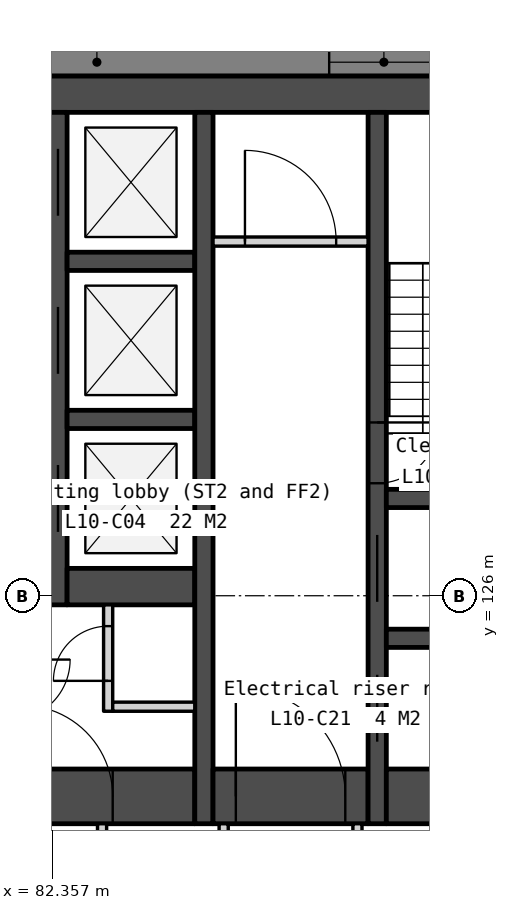
"""IFC4 building model, lengths in metres.
Left out: names, types, materials, properties, quantities, classifications, styles, units other than length and angle.
Written with IfcOpenShell. Run it as: python <this file> out.ifc"""

import sys

from ifc_helpers import new_model, si_unit, direction, frame, frame_2d, origin, place, context, subcontext, project, spatial, polyline, rectangle, outline, extrude, element, fill, save


model = new_model("IFC4")
c1 = context("Model", 3, precision=1e-05, world=origin(), true_north=direction((0.0, 1.0)))
c2 = subcontext(c1, "Body", "Model", "MODEL_VIEW")
j1 = project(units=[si_unit("LENGTHUNIT", "METRE"), si_unit("PLANEANGLEUNIT", "RADIAN")], contexts=[c1])
p1 = place(None, origin())
s1 = spatial("IfcSite", under=j1, at=p1, CompositionType="ELEMENT")
p2 = place(p1, origin())
s2 = spatial("IfcBuilding", under=s1, at=p2, CompositionType="ELEMENT")
p3 = place(p2, frame((0.0, 0.0, 49.0)))
s3 = spatial("IfcBuildingStorey", under=s2, at=p3, CompositionType="ELEMENT", Elevation=49.0)
p4 = place(p3, frame((66.0, 134.25, 0.0), z_axis=(0.0, 0.0, 1.0), x_axis=(1.0, 0.0, 0.0)))
e1 = element("IfcWall", 1, at=p4, inside=s3, PredefinedType="SOLIDWALL", context=c2, shape_type="SweptSolid", body=[
    extrude(rectangle(XDim=28.0, YDim=0.6, at=frame_2d((14.0, 0.0))), origin(), (0.0, 0.0, 1.0), 3.35),
])
p5 = place(p3, frame((81.8, 122.7, 0.0), z_axis=(0.0, 0.0, 1.0), x_axis=(1.0, 0.0, 0.0)))
e2 = element("IfcWall", 2, at=p5, inside=s3, PredefinedType="SOLIDWALL", context=c2, shape_type="SweptSolid", body=[
    extrude(rectangle(XDim=2.9, YDim=0.9, at=frame_2d((1.45, 0.0))), origin(), (0.0, 0.0, 1.0), 3.35),
])
p6 = place(p5, frame((0.05, 0.0, 0.0)))
e3 = element("IfcOpeningElement", 3, at=p6, cuts=e2, PredefinedType="OPENING", context=c2, shape_type="SweptSolid", body=[
    extrude(rectangle(XDim=1.5, YDim=2.1, at=frame_2d((0.75, 1.05))), frame((0.0, 0.46, 0.0), z_axis=(0.0, -1.0, 0.0), x_axis=(1.0, 0.0, 0.0)), (0.0, 0.0, 1.0), 0.92),
])
p7 = place(p3, frame((82.45, 133.95, 0.0), z_axis=(0.0, 0.0, 1.0), x_axis=(0.0, -1.0, 0.0)))
e4 = element("IfcWall", 4, at=p7, inside=s3, PredefinedType="SOLIDWALL", context=c2, shape_type="SweptSolid", body=[
    extrude(rectangle(XDim=8.1, YDim=0.3, at=frame_2d((4.05, 0.0))), origin(), (0.0, 0.0, 1.0), 3.35),
])
p8 = place(p7, frame((0.6, 0.0, 0.0)))
e5 = element("IfcOpeningElement", 5, at=p8, cuts=e4, PredefinedType="OPENING", context=c2, shape_type="SweptSolid", body=[
    extrude(rectangle(XDim=1.1, YDim=2.1, at=frame_2d((0.55, 1.05))), frame((0.0, 0.16, 0.0), z_axis=(0.0, -1.0, 0.0), x_axis=(1.0, 0.0, 0.0)), (0.0, 0.0, 1.0), 0.32),
])
p9 = place(p7, frame((3.2, 0.0, 0.0)))
e6 = element("IfcOpeningElement", 6, at=p9, cuts=e4, PredefinedType="OPENING", context=c2, shape_type="SweptSolid", body=[
    extrude(rectangle(XDim=1.1, YDim=2.1, at=frame_2d((0.55, 1.05))), frame((0.0, 0.16, 0.0), z_axis=(0.0, -1.0, 0.0), x_axis=(1.0, 0.0, 0.0)), (0.0, 0.0, 1.0), 0.32),
])
p10 = place(p7, frame((5.8, 0.0, 0.0)))
e7 = element("IfcOpeningElement", 7, at=p10, cuts=e4, PredefinedType="OPENING", context=c2, shape_type="SweptSolid", body=[
    extrude(rectangle(XDim=1.1, YDim=2.1, at=frame_2d((0.55, 1.05))), frame((0.0, 0.16, 0.0), z_axis=(0.0, -1.0, 0.0), x_axis=(1.0, 0.0, 0.0)), (0.0, 0.0, 1.0), 0.32),
])
for number, where, z_axis, x_axis in (
    (8, (82.6, 131.5, 0.0), (0.0, 0.0, 1.0), (1.0, 0.0, 0.0)),
    (9, (82.6, 128.9, 0.0), (0.0, 0.0, 1.0), (1.0, 0.0, 0.0)),
):
    element("IfcWall", number, at=place(p3, frame(where, z_axis=z_axis, x_axis=x_axis)), inside=s3, PredefinedType="SOLIDWALL", context=c2, shape_type="SweptSolid", body=[
        extrude(rectangle(XDim=2.1, YDim=0.3, at=frame_2d((1.05, 0.0))), origin(), (0.0, 0.0, 1.0), 3.35),
    ])
p11 = place(p3, frame((82.6, 126.15, 0.0), z_axis=(0.0, 0.0, 1.0), x_axis=(1.0, 0.0, 0.0)))
e10 = element("IfcWall", 10, at=p11, inside=s3, PredefinedType="SOLIDWALL", context=c2, shape_type="SweptSolid", body=[
    extrude(rectangle(XDim=2.1, YDim=0.6, at=frame_2d((1.05, 0.0))), origin(), (0.0, 0.0, 1.0), 3.35),
])
p12 = place(p3, frame((83.175, 122.25, 0.0), z_axis=(0.0, 0.0, 1.0), x_axis=(0.0, -1.0, 0.0)))
e11 = element("IfcWall", 11, at=p12, inside=s3, PredefinedType="PARTITIONING", context=c2, shape_type="SweptSolid", body=[
    extrude(rectangle(XDim=2.1, YDim=0.15, at=frame_2d((1.05, 0.0))), origin(), (0.0, 0.0, 1.0), 3.35),
])
p13 = place(p3, frame((83.275, 125.85, 0.0), z_axis=(0.0, 0.0, 1.0), x_axis=(0.0, -1.0, 0.0)))
e12 = element("IfcWall", 12, at=p13, inside=s3, PredefinedType="PARTITIONING", context=c2, shape_type="SweptSolid", body=[
    extrude(rectangle(XDim=1.75, YDim=0.15, at=frame_2d((0.875, 0.0))), origin(), (0.0, 0.0, 1.0), 3.35),
])
p14 = place(p13, frame((0.35, 0.0, 0.0)))
e13 = element("IfcOpeningElement", 13, at=p14, cuts=e12, PredefinedType="OPENING", context=c2, shape_type="SweptSolid", body=[
    extrude(rectangle(XDim=0.9, YDim=2.1, at=frame_2d((0.45, 1.05))), frame((0.0, 0.085, 0.0), z_axis=(0.0, -1.0, 0.0), x_axis=(1.0, 0.0, 0.0)), (0.0, 0.0, 1.0), 0.17),
])
p15 = place(p3, frame((83.35, 124.175, 0.0), z_axis=(0.0, 0.0, 1.0), x_axis=(1.0, 0.0, 0.0)))
e14 = element("IfcWall", 14, at=p15, inside=s3, PredefinedType="PARTITIONING", context=c2, shape_type="SweptSolid", body=[
    extrude(rectangle(XDim=1.35, YDim=0.15, at=frame_2d((0.675, 0.0))), origin(), (0.0, 0.0, 1.0), 3.35),
])
p16 = place(p3, frame((84.85, 133.95, 0.0), z_axis=(0.0, 0.0, 1.0), x_axis=(0.0, -1.0, 0.0)))
e15 = element("IfcWall", 15, at=p16, inside=s3, PredefinedType="SOLIDWALL", context=c2, shape_type="SweptSolid", body=[
    extrude(rectangle(XDim=11.7, YDim=0.3, at=frame_2d((5.85, 0.0))), origin(), (0.0, 0.0, 1.0), 3.35),
])
p17 = place(p3, frame((85.0, 131.825, 0.0), z_axis=(0.0, 0.0, 1.0), x_axis=(1.0, 0.0, 0.0)))
e16 = element("IfcWall", 16, at=p17, inside=s3, PredefinedType="PARTITIONING", context=c2, shape_type="SweptSolid", body=[
    extrude(rectangle(XDim=2.55, YDim=0.15, at=frame_2d((1.275, 0.0))), origin(), (0.0, 0.0, 1.0), 3.35),
])
p18 = place(p17, frame((0.525, 0.0, 0.0)))
e17 = element("IfcOpeningElement", 17, at=p18, cuts=e16, PredefinedType="OPENING", context=c2, shape_type="SweptSolid", body=[
    extrude(rectangle(XDim=1.5, YDim=2.1, at=frame_2d((0.75, 1.05))), frame((0.0, 0.085, 0.0), z_axis=(0.0, -1.0, 0.0), x_axis=(1.0, 0.0, 0.0)), (0.0, 0.0, 1.0), 0.17),
])
p19 = place(p3, frame((85.0, 122.7, 0.0), z_axis=(0.0, 0.0, 1.0), x_axis=(1.0, 0.0, 0.0)))
e18 = element("IfcWall", 18, at=p19, inside=s3, PredefinedType="SOLIDWALL", context=c2, shape_type="SweptSolid", body=[
    extrude(rectangle(XDim=2.55, YDim=0.9, at=frame_2d((1.275, 0.0))), origin(), (0.0, 0.0, 1.0), 3.35),
])
p20 = place(p19, frame((0.375, 0.0, 0.0)))
e19 = element("IfcOpeningElement", 19, at=p20, cuts=e18, PredefinedType="OPENING", context=c2, shape_type="SweptSolid", body=[
    extrude(rectangle(XDim=1.8, YDim=2.1, at=frame_2d((0.9, 1.05))), frame((0.0, 0.46, 0.0), z_axis=(0.0, -1.0, 0.0), x_axis=(1.0, 0.0, 0.0)), (0.0, 0.0, 1.0), 0.92),
])
p21 = place(p3, frame((85.175, 122.25, 0.0), z_axis=(0.0, 0.0, 1.0), x_axis=(0.0, -1.0, 0.0)))
e20 = element("IfcWall", 20, at=p21, inside=s3, PredefinedType="PARTITIONING", context=c2, shape_type="SweptSolid", body=[
    extrude(rectangle(XDim=2.1, YDim=0.15, at=frame_2d((1.05, 0.0))), origin(), (0.0, 0.0, 1.0), 3.35),
])
p22 = place(p21, frame((0.55, 0.0, 0.0)))
e21 = element("IfcOpeningElement", 21, at=p22, cuts=e20, PredefinedType="OPENING", context=c2, shape_type="SweptSolid", body=[
    extrude(rectangle(XDim=1.0, YDim=2.1, at=frame_2d((0.5, 1.05))), frame((0.0, 0.085, 0.0), z_axis=(0.0, -1.0, 0.0), x_axis=(1.0, 0.0, 0.0)), (0.0, 0.0, 1.0), 0.17),
])
p23 = place(p3, frame((87.375, 122.25, 0.0), z_axis=(0.0, 0.0, 1.0), x_axis=(0.0, -1.0, 0.0)))
e22 = element("IfcWall", 22, at=p23, inside=s3, PredefinedType="PARTITIONING", context=c2, shape_type="SweptSolid", body=[
    extrude(rectangle(XDim=2.1, YDim=0.15, at=frame_2d((1.05, 0.0))), origin(), (0.0, 0.0, 1.0), 3.35),
])
p24 = place(p3, frame((87.7, 133.95, 0.0), z_axis=(0.0, 0.0, 1.0), x_axis=(0.0, -1.0, 0.0)))
e23 = element("IfcWall", 23, at=p24, inside=s3, PredefinedType="SOLIDWALL", context=c2, shape_type="SweptSolid", body=[
    extrude(rectangle(XDim=11.7, YDim=0.3, at=frame_2d((5.85, 0.0))), origin(), (0.0, 0.0, 1.0), 3.35),
])
p25 = place(p24, frame((6.95, 0.0, 0.0)))
e24 = element("IfcOpeningElement", 24, at=p25, cuts=e23, PredefinedType="OPENING", context=c2, shape_type="SweptSolid", body=[
    extrude(rectangle(XDim=1.1, YDim=2.1, at=frame_2d((0.55, 1.05))), frame((0.0, 0.16, 0.0), z_axis=(0.0, -1.0, 0.0), x_axis=(1.0, 0.0, 0.0)), (0.0, 0.0, 1.0), 0.32),
])
p26 = place(p24, frame((5.1, 0.0, 0.0)))
e25 = element("IfcOpeningElement", 25, at=p26, cuts=e23, PredefinedType="OPENING", context=c2, shape_type="SweptSolid", body=[
    extrude(rectangle(XDim=1.0, YDim=2.1, at=frame_2d((0.5, 1.05))), frame((0.0, 0.16, 0.0), z_axis=(0.0, -1.0, 0.0), x_axis=(1.0, 0.0, 0.0)), (0.0, 0.0, 1.0), 0.32),
])
p27 = place(p24, frame((9.25, 0.0, 0.0)))
e26 = element("IfcOpeningElement", 26, at=p27, cuts=e23, PredefinedType="OPENING", context=c2, shape_type="SweptSolid", body=[
    extrude(rectangle(XDim=1.1, YDim=2.1, at=frame_2d((0.55, 1.05))), frame((0.0, 0.16, 0.0), z_axis=(0.0, -1.0, 0.0), x_axis=(1.0, 0.0, 0.0)), (0.0, 0.0, 1.0), 0.32),
])
for number, where, z_axis, x_axis in (
    (27, (87.85, 127.6, 0.0), (0.0, 0.0, 1.0), (1.0, 0.0, 0.0)),
    (28, (87.85, 125.3, 0.0), (0.0, 0.0, 1.0), (1.0, 0.0, 0.0)),
):
    element("IfcWall", number, at=place(p3, frame(where, z_axis=z_axis, x_axis=x_axis)), inside=s3, PredefinedType="SOLIDWALL", context=c2, shape_type="SweptSolid", body=[
        extrude(rectangle(XDim=2.55, YDim=0.3, at=frame_2d((1.275, 0.0))), origin(), (0.0, 0.0, 1.0), 3.35),
    ])
p28 = place(p3, frame((87.85, 122.7, 0.0), z_axis=(0.0, 0.0, 1.0), x_axis=(1.0, 0.0, 0.0)))
e29 = element("IfcWall", 29, at=p28, inside=s3, PredefinedType="SOLIDWALL", context=c2, shape_type="SweptSolid", body=[
    extrude(rectangle(XDim=2.55, YDim=0.9, at=frame_2d((1.275, 0.0))), origin(), (0.0, 0.0, 1.0), 3.35),
])
p29 = place(p3, frame((102.4, 134.775, -0.15), z_axis=(0.0, 0.0, 1.0), x_axis=(-1.0, 0.0, 0.0)))
e30 = element("IfcWall", 30, at=p29, inside=s3, PredefinedType="SOLIDWALL", context=c2, shape_type="SweptSolid", body=[
    extrude(outline(polyline([(0.0, 0.0), (0.0, 3.5), (38.62, 3.5), (38.62, 0.0), (0.0, 0.0)])), frame((0.0, 0.225, 0.0), z_axis=(0.0, -1.0, 0.0), x_axis=(1.0, 0.0, 0.0)), (0.0, 0.0, 1.0), 0.45),
])
p30 = place(p29, frame((2.43, 0.0, 1.05)))
e31 = element("IfcOpeningElement", 31, at=p30, cuts=e30, PredefinedType="OPENING", context=c2, shape_type="SweptSolid", body=[
    extrude(rectangle(XDim=1.8, YDim=1.5, at=frame_2d((0.9, 0.75))), frame((0.0, 0.235, 0.0), z_axis=(0.0, -1.0, 0.0), x_axis=(1.0, 0.0, 0.0)), (0.0, 0.0, 1.0), 0.47),
])
p31 = place(p29, frame((4.73, 0.0, 1.05)))
e32 = element("IfcOpeningElement", 32, at=p31, cuts=e30, PredefinedType="OPENING", context=c2, shape_type="SweptSolid", body=[
    extrude(rectangle(XDim=1.8, YDim=1.5, at=frame_2d((0.9, 0.75))), frame((0.0, 0.235, 0.0), z_axis=(0.0, -1.0, 0.0), x_axis=(1.0, 0.0, 0.0)), (0.0, 0.0, 1.0), 0.47),
])
p32 = place(p29, frame((11.39, 0.0, 1.05)))
e33 = element("IfcOpeningElement", 33, at=p32, cuts=e30, PredefinedType="OPENING", context=c2, shape_type="SweptSolid", body=[
    extrude(rectangle(XDim=1.8, YDim=1.5, at=frame_2d((0.9, 0.75))), frame((0.0, 0.235, 0.0), z_axis=(0.0, -1.0, 0.0), x_axis=(1.0, 0.0, 0.0)), (0.0, 0.0, 1.0), 0.47),
])
p33 = place(p29, frame((13.69, 0.0, 1.05)))
e34 = element("IfcOpeningElement", 34, at=p33, cuts=e30, PredefinedType="OPENING", context=c2, shape_type="SweptSolid", body=[
    extrude(rectangle(XDim=1.8, YDim=1.5, at=frame_2d((0.9, 0.75))), frame((0.0, 0.235, 0.0), z_axis=(0.0, -1.0, 0.0), x_axis=(1.0, 0.0, 0.0)), (0.0, 0.0, 1.0), 0.47),
])
p34 = place(p29, frame((20.35, 0.0, 1.05)))
e35 = element("IfcOpeningElement", 35, at=p34, cuts=e30, PredefinedType="OPENING", context=c2, shape_type="SweptSolid", body=[
    extrude(rectangle(XDim=1.8, YDim=1.5, at=frame_2d((0.9, 0.75))), frame((0.0, 0.235, 0.0), z_axis=(0.0, -1.0, 0.0), x_axis=(1.0, 0.0, 0.0)), (0.0, 0.0, 1.0), 0.47),
])
p35 = place(p29, frame((22.65, 0.0, 1.05)))
e36 = element("IfcOpeningElement", 36, at=p35, cuts=e30, PredefinedType="OPENING", context=c2, shape_type="SweptSolid", body=[
    extrude(rectangle(XDim=1.8, YDim=1.5, at=frame_2d((0.9, 0.75))), frame((0.0, 0.235, 0.0), z_axis=(0.0, -1.0, 0.0), x_axis=(1.0, 0.0, 0.0)), (0.0, 0.0, 1.0), 0.47),
])
p36 = place(p29, frame((29.31, 0.0, 1.05)))
e37 = element("IfcOpeningElement", 37, at=p36, cuts=e30, PredefinedType="OPENING", context=c2, shape_type="SweptSolid", body=[
    extrude(rectangle(XDim=1.8, YDim=1.5, at=frame_2d((0.9, 0.75))), frame((0.0, 0.235, 0.0), z_axis=(0.0, -1.0, 0.0), x_axis=(1.0, 0.0, 0.0)), (0.0, 0.0, 1.0), 0.47),
])
p37 = place(p29, frame((31.61, 0.0, 1.05)))
e38 = element("IfcOpeningElement", 38, at=p37, cuts=e30, PredefinedType="OPENING", context=c2, shape_type="SweptSolid", body=[
    extrude(rectangle(XDim=1.8, YDim=1.5, at=frame_2d((0.9, 0.75))), frame((0.0, 0.235, 0.0), z_axis=(0.0, -1.0, 0.0), x_axis=(1.0, 0.0, 0.0)), (0.0, 0.0, 1.0), 0.47),
])
p38 = place(p3, frame((83.105, 90.599, -0.15), z_axis=(0.0, 0.0, 1.0), x_axis=(0.499999201451, 0.866025864826, 0.0)))
e39 = element("IfcWall", 39, at=p38, inside=s3, PredefinedType="SOLIDWALL", context=c2, shape_type="SweptSolid", body=[
    extrude(outline(polyline([(44.8, 0.0), (44.8, 3.5), (0.0, 3.5), (0.0, 0.0), (44.8, 0.0)])), frame((0.0, 0.225, 0.0), z_axis=(0.0, -1.0, 0.0), x_axis=(1.0, 0.0, 0.0)), (0.0, 0.0, 1.0), 0.45),
])
p39 = place(p38, frame((2.43, 0.0, 1.05)))
e40 = element("IfcOpeningElement", 40, at=p39, cuts=e39, PredefinedType="OPENING", context=c2, shape_type="SweptSolid", body=[
    extrude(rectangle(XDim=1.8, YDim=1.5, at=frame_2d((0.9, 0.75))), frame((0.0, 0.235, 0.0), z_axis=(0.0, -1.0, 0.0), x_axis=(1.0, 0.0, 0.0)), (0.0, 0.0, 1.0), 0.47),
])
p40 = place(p38, frame((4.73, 0.0, 1.05)))
e41 = element("IfcOpeningElement", 41, at=p40, cuts=e39, PredefinedType="OPENING", context=c2, shape_type="SweptSolid", body=[
    extrude(rectangle(XDim=1.8, YDim=1.5, at=frame_2d((0.9, 0.75))), frame((0.0, 0.235, 0.0), z_axis=(0.0, -1.0, 0.0), x_axis=(1.0, 0.0, 0.0)), (0.0, 0.0, 1.0), 0.47),
])
p41 = place(p38, frame((11.39, 0.0, 1.05)))
e42 = element("IfcOpeningElement", 42, at=p41, cuts=e39, PredefinedType="OPENING", context=c2, shape_type="SweptSolid", body=[
    extrude(rectangle(XDim=1.8, YDim=1.5, at=frame_2d((0.9, 0.75))), frame((0.0, 0.235, 0.0), z_axis=(0.0, -1.0, 0.0), x_axis=(1.0, 0.0, 0.0)), (0.0, 0.0, 1.0), 0.47),
])
p42 = place(p38, frame((13.69, 0.0, 1.05)))
e43 = element("IfcOpeningElement", 43, at=p42, cuts=e39, PredefinedType="OPENING", context=c2, shape_type="SweptSolid", body=[
    extrude(rectangle(XDim=1.8, YDim=1.5, at=frame_2d((0.9, 0.75))), frame((0.0, 0.235, 0.0), z_axis=(0.0, -1.0, 0.0), x_axis=(1.0, 0.0, 0.0)), (0.0, 0.0, 1.0), 0.47),
])
p43 = place(p38, frame((20.35, 0.0, 1.05)))
e44 = element("IfcOpeningElement", 44, at=p43, cuts=e39, PredefinedType="OPENING", context=c2, shape_type="SweptSolid", body=[
    extrude(rectangle(XDim=1.8, YDim=1.5, at=frame_2d((0.9, 0.75))), frame((0.0, 0.235, 0.0), z_axis=(0.0, -1.0, 0.0), x_axis=(1.0, 0.0, 0.0)), (0.0, 0.0, 1.0), 0.47),
])
p44 = place(p38, frame((22.65, 0.0, 1.05)))
e45 = element("IfcOpeningElement", 45, at=p44, cuts=e39, PredefinedType="OPENING", context=c2, shape_type="SweptSolid", body=[
    extrude(rectangle(XDim=1.8, YDim=1.5, at=frame_2d((0.9, 0.75))), frame((0.0, 0.235, 0.0), z_axis=(0.0, -1.0, 0.0), x_axis=(1.0, 0.0, 0.0)), (0.0, 0.0, 1.0), 0.47),
])
p45 = place(p38, frame((29.31, 0.0, 1.05)))
e46 = element("IfcOpeningElement", 46, at=p45, cuts=e39, PredefinedType="OPENING", context=c2, shape_type="SweptSolid", body=[
    extrude(rectangle(XDim=1.8, YDim=1.5, at=frame_2d((0.9, 0.75))), frame((0.0, 0.235, 0.0), z_axis=(0.0, -1.0, 0.0), x_axis=(1.0, 0.0, 0.0)), (0.0, 0.0, 1.0), 0.47),
])
p46 = place(p38, frame((31.61, 0.0, 1.05)))
e47 = element("IfcOpeningElement", 47, at=p46, cuts=e39, PredefinedType="OPENING", context=c2, shape_type="SweptSolid", body=[
    extrude(rectangle(XDim=1.8, YDim=1.5, at=frame_2d((0.9, 0.75))), frame((0.0, 0.235, 0.0), z_axis=(0.0, -1.0, 0.0), x_axis=(1.0, 0.0, 0.0)), (0.0, 0.0, 1.0), 0.47),
])
p47 = place(p38, frame((38.27, 0.0, 1.05)))
e48 = element("IfcOpeningElement", 48, at=p47, cuts=e39, PredefinedType="OPENING", context=c2, shape_type="SweptSolid", body=[
    extrude(rectangle(XDim=1.8, YDim=1.5, at=frame_2d((0.9, 0.75))), frame((0.0, 0.235, 0.0), z_axis=(0.0, -1.0, 0.0), x_axis=(1.0, 0.0, 0.0)), (0.0, 0.0, 1.0), 0.47),
])
p48 = place(p38, frame((40.57, 0.0, 1.05)))
e49 = element("IfcOpeningElement", 49, at=p48, cuts=e39, PredefinedType="OPENING", context=c2, shape_type="SweptSolid", body=[
    extrude(rectangle(XDim=1.8, YDim=1.5, at=frame_2d((0.9, 0.75))), frame((0.0, 0.235, 0.0), z_axis=(0.0, -1.0, 0.0), x_axis=(1.0, 0.0, 0.0)), (0.0, 0.0, 1.0), 0.47),
])
p49 = place(p8, origin())
e50 = element("IfcDoor", 50, at=p49, inside=s3, OperationType="SLIDING_TO_LEFT", PredefinedType="DOOR", context=c2, shape_type="SweptSolid", body=[
    extrude(rectangle(XDim=1.1, YDim=2.1, at=frame_2d((0.55, 1.05))), frame((0.0, 0.025, 0.0), z_axis=(0.0, -1.0, 0.0), x_axis=(1.0, 0.0, 0.0)), (0.0, 0.0, 1.0), 0.05),
])
fill(e5, e50)
p50 = place(p9, origin())
e51 = element("IfcDoor", 51, at=p50, inside=s3, OperationType="SLIDING_TO_LEFT", PredefinedType="DOOR", context=c2, shape_type="SweptSolid", body=[
    extrude(rectangle(XDim=1.1, YDim=2.1, at=frame_2d((0.55, 1.05))), frame((0.0, 0.025, 0.0), z_axis=(0.0, -1.0, 0.0), x_axis=(1.0, 0.0, 0.0)), (0.0, 0.0, 1.0), 0.05),
])
fill(e6, e51)
p51 = place(p10, origin())
e52 = element("IfcDoor", 52, at=p51, inside=s3, OperationType="SLIDING_TO_LEFT", PredefinedType="DOOR", context=c2, shape_type="SweptSolid", body=[
    extrude(rectangle(XDim=1.1, YDim=2.1, at=frame_2d((0.55, 1.05))), frame((0.0, 0.025, 0.0), z_axis=(0.0, -1.0, 0.0), x_axis=(1.0, 0.0, 0.0)), (0.0, 0.0, 1.0), 0.05),
])
fill(e7, e52)
p52 = place(p25, origin())
e53 = element("IfcDoor", 53, at=p52, inside=s3, OperationType="SLIDING_TO_LEFT", PredefinedType="DOOR", context=c2, shape_type="SweptSolid", body=[
    extrude(rectangle(XDim=1.1, YDim=2.1, at=frame_2d((0.55, 1.05))), frame((0.0, 0.025, 0.0), z_axis=(0.0, -1.0, 0.0), x_axis=(1.0, 0.0, 0.0)), (0.0, 0.0, 1.0), 0.05),
])
fill(e24, e53)
p53 = place(p20, origin())
e54 = element("IfcDoor", 54, at=p53, inside=s3, OperationType="DOUBLE_DOOR_DOUBLE_SWING", PredefinedType="DOOR", context=c2, shape_type="SweptSolid", body=[
    extrude(rectangle(XDim=1.8, YDim=2.1, at=frame_2d((0.9, 1.05))), frame((0.0, 0.025, 0.0), z_axis=(0.0, -1.0, 0.0), x_axis=(1.0, 0.0, 0.0)), (0.0, 0.0, 1.0), 0.05),
])
fill(e19, e54)
p54 = place(p6, origin())
e55 = element("IfcDoor", 55, at=p54, inside=s3, OperationType="DOUBLE_DOOR_DOUBLE_SWING", PredefinedType="DOOR", context=c2, shape_type="SweptSolid", body=[
    extrude(rectangle(XDim=1.5, YDim=2.1, at=frame_2d((0.75, 1.05))), frame((0.0, 0.025, 0.0), z_axis=(0.0, -1.0, 0.0), x_axis=(1.0, 0.0, 0.0)), (0.0, 0.0, 1.0), 0.05),
])
fill(e3, e55)
p55 = place(p14, origin())
e56 = element("IfcDoor", 56, at=p55, inside=s3, OperationType="SINGLE_SWING_RIGHT", PredefinedType="DOOR", context=c2, shape_type="SweptSolid", body=[
    extrude(rectangle(XDim=0.9, YDim=2.1, at=frame_2d((0.45, 1.05))), frame((0.0, 0.025, 0.0), z_axis=(0.0, -1.0, 0.0), x_axis=(1.0, 0.0, 0.0)), (0.0, 0.0, 1.0), 0.05),
])
fill(e13, e56)
p56 = place(p18, origin())
e57 = element("IfcDoor", 57, at=p56, inside=s3, OperationType="DOUBLE_DOOR_DOUBLE_SWING", PredefinedType="DOOR", context=c2, shape_type="SweptSolid", body=[
    extrude(rectangle(XDim=1.5, YDim=2.1, at=frame_2d((0.75, 1.05))), frame((0.0, 0.025, 0.0), z_axis=(0.0, -1.0, 0.0), x_axis=(1.0, 0.0, 0.0)), (0.0, 0.0, 1.0), 0.05),
])
fill(e17, e57)
p57 = place(p26, origin())
e58 = element("IfcDoor", 58, at=p57, inside=s3, OperationType="SINGLE_SWING_LEFT", PredefinedType="DOOR", context=c2, shape_type="SweptSolid", body=[
    extrude(rectangle(XDim=1.0, YDim=2.1, at=frame_2d((0.5, 1.05))), frame((0.0, 0.025, 0.0), z_axis=(0.0, -1.0, 0.0), x_axis=(1.0, 0.0, 0.0)), (0.0, 0.0, 1.0), 0.05),
])
fill(e25, e58)
p58 = place(p27, origin())
e59 = element("IfcDoor", 59, at=p58, inside=s3, OperationType="SLIDING_TO_LEFT", PredefinedType="DOOR", context=c2, shape_type="SweptSolid", body=[
    extrude(rectangle(XDim=1.1, YDim=2.1, at=frame_2d((0.55, 1.05))), frame((0.0, 0.025, 0.0), z_axis=(0.0, -1.0, 0.0), x_axis=(1.0, 0.0, 0.0)), (0.0, 0.0, 1.0), 0.05),
])
fill(e26, e59)
p59 = place(p33, origin())
e60 = element("IfcWindow", 60, at=p59, inside=s3, PartitioningType="SINGLE_PANEL", PredefinedType="WINDOW", context=c2, shape_type="SweptSolid", body=[
    extrude(rectangle(XDim=1.8, YDim=1.5, at=frame_2d((0.9, 0.75))), frame((0.0, 0.03, 0.0), z_axis=(0.0, -1.0, 0.0), x_axis=(1.0, 0.0, 0.0)), (0.0, 0.0, 1.0), 0.06),
])
fill(e34, e60)
save(model, sys.argv[1])
